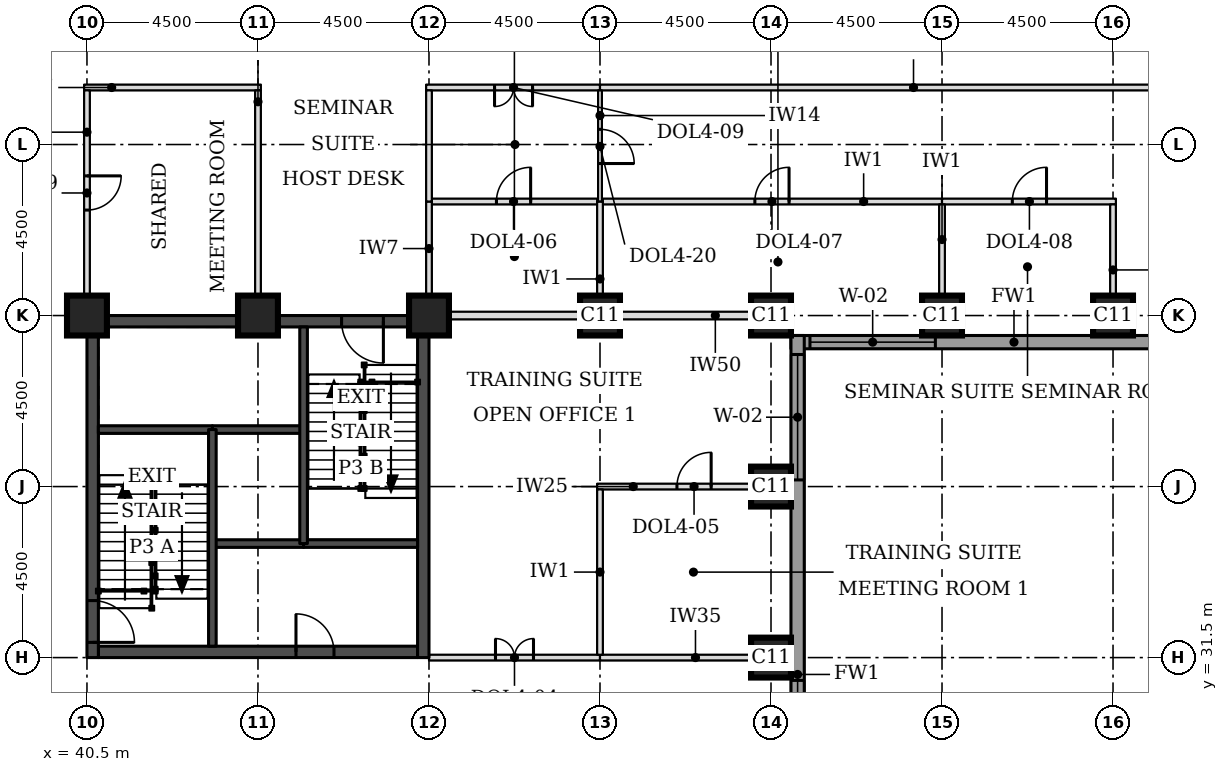
"""IFC4 building model, lengths in metres.
Left out: names, types, materials, properties, quantities, classifications, styles, units other than length and angle.
Written with IfcOpenShell. Run it as: python <this file> out.ifc"""

import sys

from ifc_helpers import new_model, si_unit, direction, frame, frame_2d, origin, origin_2d, place, context, subcontext, project, spatial, rectangle, extrude, element, fill, save


model = new_model("IFC4")
c1 = context("Model", 3, precision=1e-05, world=origin(), true_north=direction((0.0, 1.0)))
c2 = subcontext(c1, "Body", "Model", "MODEL_VIEW")
j1 = project(units=[si_unit("LENGTHUNIT", "METRE"), si_unit("PLANEANGLEUNIT", "RADIAN")], contexts=[c1])
p1 = place(None, origin())
s1 = spatial("IfcSite", under=j1, at=p1, CompositionType="ELEMENT")
p2 = place(p1, origin())
s2 = spatial("IfcBuilding", under=s1, at=p2, CompositionType="ELEMENT")
p3 = place(p2, frame((0.0, 0.0, 101.1)))
s3 = spatial("IfcBuildingStorey", under=s2, at=p3, CompositionType="ELEMENT", Elevation=101.1)
for number, where, z_axis, x_axis in (
    (1, (58.5, 31.5, 0.0), (0.0, 0.0, 1.0), (1.0, 0.0, 0.0)),
    (2, (58.5, 36.0, 0.0), (0.0, 0.0, 1.0), (1.0, 0.0, 0.0)),
    (3, (40.5, 40.5, 0.0), (0.0, 0.0, 1.0), (1.0, 0.0, 0.0)),
    (4, (45.0, 40.5, 0.0), (0.0, 0.0, 1.0), (1.0, 0.0, 0.0)),
    (5, (49.5, 40.5, 0.0), (0.0, 0.0, 1.0), (1.0, 0.0, 0.0)),
    (6, (54.0, 40.5, 0.0), (0.0, 0.0, 1.0), (1.0, 0.0, 0.0)),
    (7, (58.5, 40.5, 0.0), (0.0, 0.0, 1.0), (1.0, 0.0, 0.0)),
    (8, (63.0, 40.5, 0.0), (0.0, 0.0, 1.0), (1.0, 0.0, 0.0)),
    (9, (67.5, 40.5, 0.0), (0.0, 0.0, 1.0), (1.0, 0.0, 0.0)),
):
    element("IfcColumn", number, at=place(p3, frame(where, z_axis=z_axis, x_axis=x_axis)), inside=s3, PredefinedType="COLUMN", context=c2, shape_type="SweptSolid", body=[
        extrude(rectangle(XDim=1.05, YDim=1.05, at=origin_2d()), origin(), (0.0, 0.0, 1.0), 3.7),
    ])
p4 = place(p3, frame((40.8, 31.65, 0.0), z_axis=(0.0, 0.0, 1.0), x_axis=(1.0, 0.0, 0.0)))
e10 = element("IfcWall", 10, at=p4, inside=s3, PredefinedType="SHEAR", context=c2, shape_type="SweptSolid", body=[
    extrude(rectangle(XDim=8.4, YDim=0.3, at=frame_2d((4.2, 0.0))), origin(), (0.0, 0.0, 1.0), 3.7),
])
p5 = place(p4, frame((5.2, 0.0, 0.0)))
e11 = element("IfcOpeningElement", 11, at=p5, cuts=e10, PredefinedType="OPENING", context=c2, shape_type="SweptSolid", body=[
    extrude(rectangle(XDim=1.0, YDim=2.1, at=frame_2d((0.5, 1.05))), frame((0.0, 0.16, 0.0), z_axis=(0.0, -1.0, 0.0), x_axis=(1.0, 0.0, 0.0)), (0.0, 0.0, 1.0), 0.32),
])
p6 = place(p3, frame((40.8, 40.35, 0.0), z_axis=(0.0, 0.0, 1.0), x_axis=(1.0, 0.0, 0.0)))
e12 = element("IfcWall", 12, at=p6, inside=s3, PredefinedType="SHEAR", context=c2, shape_type="SweptSolid", body=[
    extrude(rectangle(XDim=8.4, YDim=0.3, at=frame_2d((4.2, 0.0))), origin(), (0.0, 0.0, 1.0), 3.7),
])
p7 = place(p6, frame((6.4, 0.0, 0.0)))
e13 = element("IfcOpeningElement", 13, at=p7, cuts=e12, PredefinedType="OPENING", context=c2, shape_type="SweptSolid", body=[
    extrude(rectangle(XDim=1.1, YDim=2.1, at=frame_2d((0.55, 1.05))), frame((0.0, 0.16, 0.0), z_axis=(0.0, -1.0, 0.0), x_axis=(1.0, 0.0, 0.0)), (0.0, 0.0, 1.0), 0.32),
])
p8 = place(p3, frame((40.65, 31.5, 0.0), z_axis=(0.0, 0.0, 1.0), x_axis=(0.0, 1.0, 0.0)))
e14 = element("IfcWall", 14, at=p8, inside=s3, PredefinedType="SHEAR", context=c2, shape_type="SweptSolid", body=[
    extrude(rectangle(XDim=9.0, YDim=0.3, at=frame_2d((4.5, 0.0))), origin(), (0.0, 0.0, 1.0), 3.7),
])
p9 = place(p8, frame((0.4, 0.0, 0.0)))
e15 = element("IfcOpeningElement", 15, at=p9, cuts=e14, PredefinedType="OPENING", context=c2, shape_type="SweptSolid", body=[
    extrude(rectangle(XDim=1.1, YDim=2.1, at=frame_2d((0.55, 1.05))), frame((0.0, 0.16, 0.0), z_axis=(0.0, -1.0, 0.0), x_axis=(1.0, 0.0, 0.0)), (0.0, 0.0, 1.0), 0.32),
])
p10 = place(p3, frame((49.35, 31.5, 0.0), z_axis=(0.0, 0.0, 1.0), x_axis=(0.0, 1.0, 0.0)))
e16 = element("IfcWall", 16, at=p10, inside=s3, PredefinedType="SHEAR", context=c2, shape_type="SweptSolid", body=[
    extrude(rectangle(XDim=9.0, YDim=0.3, at=frame_2d((4.5, 0.0))), origin(), (0.0, 0.0, 1.0), 3.7),
])
p11 = place(p3, frame((59.025, 39.8, 0.0), z_axis=(0.0, 0.0, 1.0), x_axis=(1.0, 0.0, 0.0)))
e17 = element("IfcWall", 17, at=p11, inside=s3, PredefinedType="STANDARD", context=c2, shape_type="SweptSolid", body=[
    extrude(rectangle(XDim=13.337, YDim=0.35, at=frame_2d((6.669, 0.0))), origin(), (0.0, 0.0, 1.0), 3.525),
])
p12 = place(p11, frame((0.5, 0.0, 0.9)))
e18 = element("IfcOpeningElement", 18, at=p12, cuts=e17, PredefinedType="OPENING", context=c2, shape_type="SweptSolid", body=[
    extrude(rectangle(XDim=3.3, YDim=1.9, at=frame_2d((1.65, 0.95))), frame((0.0, 0.185, 0.0), z_axis=(0.0, -1.0, 0.0), x_axis=(1.0, 0.0, 0.0)), (0.0, 0.0, 1.0), 0.37),
])
p13 = place(p3, frame((59.2, 22.138, 0.0), z_axis=(0.0, 0.0, 1.0), x_axis=(0.0, 1.0, 0.0)))
e19 = element("IfcWall", 19, at=p13, inside=s3, PredefinedType="STANDARD", context=c2, shape_type="SweptSolid", body=[
    extrude(rectangle(XDim=17.837, YDim=0.35, at=frame_2d((8.919, 0.0))), origin(), (0.0, 0.0, 1.0), 3.525),
])
p14 = place(p13, frame((5.462, 0.0, 0.9)))
e20 = element("IfcOpeningElement", 20, at=p14, cuts=e19, PredefinedType="OPENING", context=c2, shape_type="SweptSolid", body=[
    extrude(rectangle(XDim=3.3, YDim=1.9, at=frame_2d((1.65, 0.95))), frame((0.0, 0.185, 0.0), z_axis=(0.0, -1.0, 0.0), x_axis=(1.0, 0.0, 0.0)), (0.0, 0.0, 1.0), 0.37),
])
p15 = place(p13, frame((14.037, 0.0, 0.9)))
e21 = element("IfcOpeningElement", 21, at=p15, cuts=e19, PredefinedType="OPENING", context=c2, shape_type="SweptSolid", body=[
    extrude(rectangle(XDim=3.3, YDim=1.9, at=frame_2d((1.65, 0.95))), frame((0.0, 0.185, 0.0), z_axis=(0.0, -1.0, 0.0), x_axis=(1.0, 0.0, 0.0)), (0.0, 0.0, 1.0), 0.37),
])
p16 = place(p3, frame((49.5, 31.5, 0.0), z_axis=(0.0, 0.0, 1.0), x_axis=(1.0, 0.0, 0.0)))
e22 = element("IfcWall", 22, at=p16, inside=s3, PredefinedType="PARTITIONING", context=c2, shape_type="SweptSolid", body=[
    extrude(rectangle(XDim=4.5, YDim=0.15, at=frame_2d((2.25, 0.0))), origin(), (0.0, 0.0, 1.0), 2.55),
])
p17 = place(p16, frame((1.75, 0.0, 0.0)))
e23 = element("IfcOpeningElement", 23, at=p17, cuts=e22, PredefinedType="OPENING", context=c2, shape_type="SweptSolid", body=[
    extrude(rectangle(XDim=1.0, YDim=2.1, at=frame_2d((0.5, 1.05))), frame((0.0, 0.085, 0.0), z_axis=(0.0, -1.0, 0.0), x_axis=(1.0, 0.0, 0.0)), (0.0, 0.0, 1.0), 0.17),
])
p18 = place(p3, frame((54.0, 31.5, 0.0), z_axis=(0.0, 0.0, 1.0), x_axis=(1.0, 0.0, 0.0)))
e24 = element("IfcWall", 24, at=p18, inside=s3, PredefinedType="PARTITIONING", context=c2, shape_type="SweptSolid", body=[
    extrude(rectangle(XDim=5.025, YDim=0.15, at=frame_2d((2.512, 0.0))), origin(), (0.0, 0.0, 1.0), 2.55),
])
p19 = place(p3, frame((53.925, 36.0, 0.0), z_axis=(0.0, 0.0, 1.0), x_axis=(1.0, 0.0, 0.0)))
e25 = element("IfcWall", 25, at=p19, inside=s3, PredefinedType="PARTITIONING", context=c2, shape_type="SweptSolid", body=[
    extrude(rectangle(XDim=5.1, YDim=0.15, at=frame_2d((2.55, 0.0))), origin(), (0.0, 0.0, 1.0), 3.096),
])
p20 = place(p19, frame((2.1, 0.0, 0.0)))
e26 = element("IfcOpeningElement", 26, at=p20, cuts=e25, PredefinedType="OPENING", context=c2, shape_type="SweptSolid", body=[
    extrude(rectangle(XDim=0.9, YDim=2.1, at=frame_2d((0.45, 1.05))), frame((0.0, 0.085, 0.0), z_axis=(0.0, -1.0, 0.0), x_axis=(1.0, 0.0, 0.0)), (0.0, 0.0, 1.0), 0.17),
])
p21 = place(p3, frame((50.015, 40.5, 0.0), z_axis=(0.0, 0.0, 1.0), x_axis=(1.0, 0.0, 0.0)))
e27 = element("IfcWall", 27, at=p21, inside=s3, PredefinedType="PARTITIONING", context=c2, shape_type="SweptSolid", body=[
    extrude(rectangle(XDim=3.46, YDim=0.2, at=frame_2d((1.73, 0.0))), origin(), (0.0, 0.0, 1.0), 2.8),
])
p22 = place(p3, frame((54.495, 40.5, 0.0), z_axis=(0.0, 0.0, 1.0), x_axis=(1.0, 0.0, 0.0)))
e28 = element("IfcWall", 28, at=p22, inside=s3, PredefinedType="PARTITIONING", context=c2, shape_type="SweptSolid", body=[
    extrude(rectangle(XDim=3.48, YDim=0.2, at=frame_2d((1.74, 0.0))), origin(), (0.0, 0.0, 1.0), 2.8),
])
p23 = place(p3, frame((49.575, 43.5, 0.0), z_axis=(0.0, 0.0, 1.0), x_axis=(1.0, 0.0, 0.0)))
e29 = element("IfcWall", 29, at=p23, inside=s3, PredefinedType="PARTITIONING", context=c2, shape_type="SweptSolid", body=[
    extrude(rectangle(XDim=4.35, YDim=0.15, at=frame_2d((2.175, 0.0))), origin(), (0.0, 0.0, 1.0), 3.55),
])
p24 = place(p23, frame((1.7, 0.0, 0.0)))
e30 = element("IfcOpeningElement", 30, at=p24, cuts=e29, PredefinedType="OPENING", context=c2, shape_type="SweptSolid", body=[
    extrude(rectangle(XDim=0.9, YDim=2.1, at=frame_2d((0.45, 1.05))), frame((0.0, 0.085, 0.0), z_axis=(0.0, -1.0, 0.0), x_axis=(1.0, 0.0, 0.0)), (0.0, 0.0, 1.0), 0.17),
])
p25 = place(p3, frame((54.075, 43.5, 0.0), z_axis=(0.0, 0.0, 1.0), x_axis=(1.0, 0.0, 0.0)))
e31 = element("IfcWall", 31, at=p25, inside=s3, PredefinedType="PARTITIONING", context=c2, shape_type="SweptSolid", body=[
    extrude(rectangle(XDim=8.925, YDim=0.15, at=frame_2d((4.462, 0.0))), origin(), (0.0, 0.0, 1.0), 3.55),
])
p26 = place(p25, frame((4.0, 0.0, 0.0)))
e32 = element("IfcOpeningElement", 32, at=p26, cuts=e31, PredefinedType="OPENING", context=c2, shape_type="SweptSolid", body=[
    extrude(rectangle(XDim=0.9, YDim=2.1, at=frame_2d((0.45, 1.05))), frame((0.0, 0.085, 0.0), z_axis=(0.0, -1.0, 0.0), x_axis=(1.0, 0.0, 0.0)), (0.0, 0.0, 1.0), 0.17),
])
p27 = place(p3, frame((63.0, 43.5, 0.0), z_axis=(0.0, 0.0, 1.0), x_axis=(1.0, 0.0, 0.0)))
e33 = element("IfcWall", 33, at=p27, inside=s3, PredefinedType="PARTITIONING", context=c2, shape_type="SweptSolid", body=[
    extrude(rectangle(XDim=4.575, YDim=0.15, at=frame_2d((2.288, 0.0))), origin(), (0.0, 0.0, 1.0), 3.55),
])
p28 = place(p27, frame((1.85, 0.0, 0.0)))
e34 = element("IfcOpeningElement", 34, at=p28, cuts=e33, PredefinedType="OPENING", context=c2, shape_type="SweptSolid", body=[
    extrude(rectangle(XDim=0.9, YDim=2.1, at=frame_2d((0.45, 1.05))), frame((0.0, 0.085, 0.0), z_axis=(0.0, -1.0, 0.0), x_axis=(1.0, 0.0, 0.0)), (0.0, 0.0, 1.0), 0.17),
])
p29 = place(p3, frame((40.425, 46.5, 0.0), z_axis=(0.0, 0.0, 1.0), x_axis=(1.0, 0.0, 0.0)))
e35 = element("IfcWall", 35, at=p29, inside=s3, PredefinedType="PARTITIONING", context=c2, shape_type="SweptSolid", body=[
    extrude(rectangle(XDim=4.65, YDim=0.15, at=frame_2d((2.325, 0.0))), origin(), (0.0, 0.0, 1.0), 3.55),
])
p30 = place(p3, frame((49.425, 46.5, 0.0), z_axis=(0.0, 0.0, 1.0), x_axis=(1.0, 0.0, 0.0)))
e36 = element("IfcWall", 36, at=p30, inside=s3, PredefinedType="PARTITIONING", context=c2, shape_type="SweptSolid", body=[
    extrude(rectangle(XDim=4.575, YDim=0.15, at=frame_2d((2.288, 0.0))), origin(), (0.0, 0.0, 1.0), 3.55),
])
p31 = place(p30, frame((1.8, 0.0, 0.0)))
e37 = element("IfcOpeningElement", 37, at=p31, cuts=e36, PredefinedType="OPENING", context=c2, shape_type="SweptSolid", body=[
    extrude(rectangle(XDim=1.0, YDim=2.1, at=frame_2d((0.5, 1.05))), frame((0.0, 0.085, 0.0), z_axis=(0.0, -1.0, 0.0), x_axis=(1.0, 0.0, 0.0)), (0.0, 0.0, 1.0), 0.17),
])
p32 = place(p3, frame((54.0, 46.5, 0.0), z_axis=(0.0, 0.0, 1.0), x_axis=(1.0, 0.0, 0.0)))
e38 = element("IfcWall", 38, at=p32, inside=s3, PredefinedType="PARTITIONING", context=c2, shape_type="SweptSolid", body=[
    extrude(rectangle(XDim=16.5, YDim=0.15, at=frame_2d((8.25, 0.0))), origin(), (0.0, 0.0, 1.0), 3.55),
])
p33 = place(p3, frame((54.0, 31.575, 0.0), z_axis=(0.0, 0.0, 1.0), x_axis=(0.0, 1.0, 0.0)))
e39 = element("IfcWall", 39, at=p33, inside=s3, PredefinedType="PARTITIONING", context=c2, shape_type="SweptSolid", body=[
    extrude(rectangle(XDim=4.35, YDim=0.15, at=frame_2d((2.175, 0.0))), origin(), (0.0, 0.0, 1.0), 3.55),
])
for number, where, z_axis, x_axis in (
    (40, (63.0, 39.975, 0.0), (0.0, 0.0, 1.0), (0.0, 1.0, 0.0)),
    (41, (67.5, 39.975, 0.0), (0.0, 0.0, 1.0), (0.0, 1.0, 0.0)),
):
    element("IfcWall", number, at=place(p3, frame(where, z_axis=z_axis, x_axis=x_axis)), inside=s3, PredefinedType="PARTITIONING", context=c2, shape_type="SweptSolid", body=[
        extrude(rectangle(XDim=3.45, YDim=0.15, at=frame_2d((1.725, 0.0))), origin(), (0.0, 0.0, 1.0), 3.55),
    ])
p34 = place(p3, frame((40.5, 41.025, 0.0), z_axis=(0.0, 0.0, 1.0), x_axis=(0.0, 1.0, 0.0)))
e42 = element("IfcWall", 42, at=p34, inside=s3, PredefinedType="PARTITIONING", context=c2, shape_type="SweptSolid", body=[
    extrude(rectangle(XDim=5.4, YDim=0.15, at=frame_2d((2.7, 0.0))), origin(), (0.0, 0.0, 1.0), 3.55),
])
p35 = place(p34, frame((2.25, 0.0, 0.0)))
e43 = element("IfcOpeningElement", 43, at=p35, cuts=e42, PredefinedType="OPENING", context=c2, shape_type="SweptSolid", body=[
    extrude(rectangle(XDim=0.9, YDim=2.1, at=frame_2d((0.45, 1.05))), frame((0.0, 0.085, 0.0), z_axis=(0.0, -1.0, 0.0), x_axis=(1.0, 0.0, 0.0)), (0.0, 0.0, 1.0), 0.17),
])
p36 = place(p3, frame((45.0, 41.025, 0.0), z_axis=(0.0, 0.0, 1.0), x_axis=(0.0, 1.0, 0.0)))
e44 = element("IfcWall", 44, at=p36, inside=s3, PredefinedType="PARTITIONING", context=c2, shape_type="SweptSolid", body=[
    extrude(rectangle(XDim=5.4, YDim=0.15, at=frame_2d((2.7, 0.0))), origin(), (0.0, 0.0, 1.0), 3.55),
])
for number, where, z_axis, x_axis in (
    (45, (49.5, 41.025, 0.0), (0.0, 0.0, 1.0), (0.0, 1.0, 0.0)),
    (46, (54.0, 41.025, 0.0), (0.0, 0.0, 1.0), (0.0, 1.0, 0.0)),
):
    element("IfcWall", number, at=place(p3, frame(where, z_axis=z_axis, x_axis=x_axis)), inside=s3, PredefinedType="PARTITIONING", context=c2, shape_type="SweptSolid", body=[
        extrude(rectangle(XDim=2.475, YDim=0.15, at=frame_2d((1.238, 0.0))), origin(), (0.0, 0.0, 1.0), 3.55),
    ])
p37 = place(p3, frame((49.5, 43.5, 0.0), z_axis=(0.0, 0.0, 1.0), x_axis=(0.0, 1.0, 0.0)))
e47 = element("IfcWall", 47, at=p37, inside=s3, PredefinedType="PARTITIONING", context=c2, shape_type="SweptSolid", body=[
    extrude(rectangle(XDim=2.925, YDim=0.15, at=frame_2d((1.462, 0.0))), origin(), (0.0, 0.0, 1.0), 3.55),
])
p38 = place(p3, frame((54.0, 43.5, 0.0), z_axis=(0.0, 0.0, 1.0), x_axis=(0.0, 1.0, 0.0)))
e48 = element("IfcWall", 48, at=p38, inside=s3, PredefinedType="PARTITIONING", context=c2, shape_type="SweptSolid", body=[
    extrude(rectangle(XDim=2.925, YDim=0.1, at=frame_2d((1.462, 0.0))), origin(), (0.0, 0.0, 1.0), 3.55),
])
p39 = place(p38, frame((1.0, 0.0, 0.0)))
e49 = element("IfcOpeningElement", 49, at=p39, cuts=e48, PredefinedType="OPENING", context=c2, shape_type="SweptSolid", body=[
    extrude(rectangle(XDim=0.9, YDim=2.1, at=frame_2d((0.45, 1.05))), frame((0.0, 0.06, 0.0), z_axis=(0.0, -1.0, 0.0), x_axis=(1.0, 0.0, 0.0)), (0.0, 0.0, 1.0), 0.12),
])
p40 = place(p3, frame((43.8, 34.5, 0.0), z_axis=(0.0, 0.0, 1.0), x_axis=(1.0, 0.0, 0.0)))
e50 = element("IfcWall", 50, at=p40, inside=s3, PredefinedType="SOLIDWALL", context=c2, shape_type="SweptSolid", body=[
    extrude(rectangle(XDim=2.4, YDim=0.2, at=frame_2d((1.2, 0.0))), origin(), (0.0, 0.0, 1.0), 3.55),
])
p41 = place(p3, frame((46.2, 34.5, 0.0), z_axis=(0.0, 0.0, 1.0), x_axis=(1.0, 0.0, 0.0)))
e51 = element("IfcWall", 51, at=p41, inside=s3, PredefinedType="SOLIDWALL", context=c2, shape_type="SweptSolid", body=[
    extrude(rectangle(XDim=3.0, YDim=0.2, at=frame_2d((1.5, 0.0))), origin(), (0.0, 0.0, 1.0), 3.55),
])
p42 = place(p3, frame((43.8, 37.5, 0.0), z_axis=(0.0, 0.0, 1.0), x_axis=(1.0, 0.0, 0.0)))
e52 = element("IfcWall", 52, at=p42, inside=s3, PredefinedType="SOLIDWALL", context=c2, shape_type="SweptSolid", body=[
    extrude(rectangle(XDim=2.4, YDim=0.2, at=frame_2d((1.2, 0.0))), origin(), (0.0, 0.0, 1.0), 3.7),
])
p43 = place(p3, frame((40.8, 37.5, 0.0), z_axis=(0.0, 0.0, 1.0), x_axis=(1.0, 0.0, 0.0)))
e53 = element("IfcWall", 53, at=p43, inside=s3, PredefinedType="SOLIDWALL", context=c2, shape_type="SweptSolid", body=[
    extrude(rectangle(XDim=3.0, YDim=0.2, at=frame_2d((1.5, 0.0))), origin(), (0.0, 0.0, 1.0), 3.55),
])
for number, where, z_axis, x_axis in (
    (54, (43.8, 31.8, 0.0), (0.0, 0.0, 1.0), (0.0, 1.0, 0.0)),
    (55, (46.2, 34.5, 0.0), (0.0, 0.0, 1.0), (0.0, 1.0, 0.0)),
):
    element("IfcWall", number, at=place(p3, frame(where, z_axis=z_axis, x_axis=x_axis)), inside=s3, PredefinedType="SOLIDWALL", context=c2, shape_type="SweptSolid", body=[
        extrude(rectangle(XDim=5.7, YDim=0.2, at=frame_2d((2.85, 0.0))), origin(), (0.0, 0.0, 1.0), 3.55),
    ])
p44 = place(p12, origin())
e56 = element("IfcWindow", 56, at=p44, inside=s3, PartitioningType="SINGLE_PANEL", PredefinedType="WINDOW", context=c2, shape_type="SweptSolid", body=[
    extrude(rectangle(XDim=3.3, YDim=1.9, at=frame_2d((1.65, 0.95))), frame((0.0, 0.085, 0.0), z_axis=(0.0, -1.0, 0.0), x_axis=(1.0, 0.0, 0.0)), (0.0, 0.0, 1.0), 0.06),
])
fill(e18, e56)
p45 = place(p14, origin())
e57 = element("IfcWindow", 57, at=p45, inside=s3, PartitioningType="SINGLE_PANEL", PredefinedType="WINDOW", context=c2, shape_type="SweptSolid", body=[
    extrude(rectangle(XDim=3.3, YDim=1.9, at=frame_2d((1.65, 0.95))), frame((0.0, 0.085, 0.0), z_axis=(0.0, -1.0, 0.0), x_axis=(1.0, 0.0, 0.0)), (0.0, 0.0, 1.0), 0.06),
])
fill(e20, e57)
p46 = place(p15, origin())
e58 = element("IfcWindow", 58, at=p46, inside=s3, PartitioningType="SINGLE_PANEL", PredefinedType="WINDOW", context=c2, shape_type="SweptSolid", body=[
    extrude(rectangle(XDim=3.3, YDim=1.9, at=frame_2d((1.65, 0.95))), frame((0.0, 0.085, 0.0), z_axis=(0.0, -1.0, 0.0), x_axis=(1.0, 0.0, 0.0)), (0.0, 0.0, 1.0), 0.06),
])
fill(e21, e58)
p47 = place(p35, frame((0.9, 0.0, 0.0), z_axis=(0.0, 0.0, 1.0), x_axis=(-1.0, 0.0, 0.0)))
e59 = element("IfcDoor", 59, at=p47, inside=s3, OperationType="SINGLE_SWING_LEFT", PredefinedType="DOOR", context=c2, shape_type="SweptSolid", body=[
    extrude(rectangle(XDim=0.9, YDim=2.1, at=frame_2d((0.45, 1.05))), frame((0.0, 0.025, 0.0), z_axis=(0.0, -1.0, 0.0), x_axis=(1.0, 0.0, 0.0)), (0.0, 0.0, 1.0), 0.05),
])
fill(e43, e59)
p48 = place(p17, origin())
e60 = element("IfcDoor", 60, at=p48, inside=s3, OperationType="DOUBLE_DOOR_SINGLE_SWING", PredefinedType="DOOR", context=c2, shape_type="SweptSolid", body=[
    extrude(rectangle(XDim=1.0, YDim=2.1, at=frame_2d((0.5, 1.05))), frame((0.0, 0.025, 0.0), z_axis=(0.0, -1.0, 0.0), x_axis=(1.0, 0.0, 0.0)), (0.0, 0.0, 1.0), 0.05),
])
fill(e23, e60)
p49 = place(p20, origin())
e61 = element("IfcDoor", 61, at=p49, inside=s3, OperationType="SINGLE_SWING_RIGHT", PredefinedType="DOOR", context=c2, shape_type="SweptSolid", body=[
    extrude(rectangle(XDim=0.9, YDim=2.1, at=frame_2d((0.45, 1.05))), frame((0.0, 0.025, 0.0), z_axis=(0.0, -1.0, 0.0), x_axis=(1.0, 0.0, 0.0)), (0.0, 0.0, 1.0), 0.05),
])
fill(e26, e61)
p50 = place(p31, frame((1.0, 0.0, 0.0), z_axis=(0.0, 0.0, 1.0), x_axis=(-1.0, 0.0, 0.0)))
e62 = element("IfcDoor", 62, at=p50, inside=s3, OperationType="DOUBLE_DOOR_SINGLE_SWING", PredefinedType="DOOR", context=c2, shape_type="SweptSolid", body=[
    extrude(rectangle(XDim=1.0, YDim=2.1, at=frame_2d((0.5, 1.05))), frame((0.0, 0.025, 0.0), z_axis=(0.0, -1.0, 0.0), x_axis=(1.0, 0.0, 0.0)), (0.0, 0.0, 1.0), 0.05),
])
fill(e37, e62)
p51 = place(p39, frame((0.9, 0.0, 0.0), z_axis=(0.0, 0.0, 1.0), x_axis=(-1.0, 0.0, 0.0)))
e63 = element("IfcDoor", 63, at=p51, inside=s3, OperationType="SINGLE_SWING_RIGHT", PredefinedType="DOOR", context=c2, shape_type="SweptSolid", body=[
    extrude(rectangle(XDim=0.9, YDim=2.1, at=frame_2d((0.45, 1.05))), frame((0.0, 0.025, 0.0), z_axis=(0.0, -1.0, 0.0), x_axis=(1.0, 0.0, 0.0)), (0.0, 0.0, 1.0), 0.05),
])
fill(e49, e63)
p52 = place(p24, origin())
e64 = element("IfcDoor", 64, at=p52, inside=s3, OperationType="SINGLE_SWING_RIGHT", PredefinedType="DOOR", context=c2, shape_type="SweptSolid", body=[
    extrude(rectangle(XDim=0.9, YDim=2.1, at=frame_2d((0.45, 1.05))), frame((0.0, 0.025, 0.0), z_axis=(0.0, -1.0, 0.0), x_axis=(1.0, 0.0, 0.0)), (0.0, 0.0, 1.0), 0.05),
])
fill(e30, e64)
p53 = place(p26, origin())
e65 = element("IfcDoor", 65, at=p53, inside=s3, OperationType="SINGLE_SWING_RIGHT", PredefinedType="DOOR", context=c2, shape_type="SweptSolid", body=[
    extrude(rectangle(XDim=0.9, YDim=2.1, at=frame_2d((0.45, 1.05))), frame((0.0, 0.025, 0.0), z_axis=(0.0, -1.0, 0.0), x_axis=(1.0, 0.0, 0.0)), (0.0, 0.0, 1.0), 0.05),
])
fill(e32, e65)
p54 = place(p28, origin())
e66 = element("IfcDoor", 66, at=p54, inside=s3, OperationType="SINGLE_SWING_RIGHT", PredefinedType="DOOR", context=c2, shape_type="SweptSolid", body=[
    extrude(rectangle(XDim=0.9, YDim=2.1, at=frame_2d((0.45, 1.05))), frame((0.0, 0.025, 0.0), z_axis=(0.0, -1.0, 0.0), x_axis=(1.0, 0.0, 0.0)), (0.0, 0.0, 1.0), 0.05),
])
fill(e34, e66)
p55 = place(p9, frame((1.1, 0.0, 0.0), z_axis=(0.0, 0.0, 1.0), x_axis=(-1.0, 0.0, 0.0)))
e67 = element("IfcDoor", 67, at=p55, inside=s3, OperationType="SINGLE_SWING_RIGHT", PredefinedType="DOOR", context=c2, shape_type="SweptSolid", body=[
    extrude(rectangle(XDim=1.1, YDim=2.1, at=frame_2d((0.55, 1.05))), frame((0.0, 0.025, 0.0), z_axis=(0.0, -1.0, 0.0), x_axis=(1.0, 0.0, 0.0)), (0.0, 0.0, 1.0), 0.05),
])
fill(e15, e67)
p56 = place(p7, frame((1.1, 0.0, 0.0), z_axis=(0.0, 0.0, 1.0), x_axis=(-1.0, 0.0, 0.0)))
e68 = element("IfcDoor", 68, at=p56, inside=s3, OperationType="SINGLE_SWING_LEFT", PredefinedType="DOOR", context=c2, shape_type="SweptSolid", body=[
    extrude(rectangle(XDim=1.1, YDim=2.1, at=frame_2d((0.55, 1.05))), frame((0.0, 0.025, 0.0), z_axis=(0.0, -1.0, 0.0), x_axis=(1.0, 0.0, 0.0)), (0.0, 0.0, 1.0), 0.05),
])
fill(e13, e68)
p57 = place(p5, origin())
e69 = element("IfcDoor", 69, at=p57, inside=s3, OperationType="SINGLE_SWING_LEFT", PredefinedType="DOOR", context=c2, shape_type="SweptSolid", body=[
    extrude(rectangle(XDim=1.0, YDim=2.1, at=frame_2d((0.5, 1.05))), frame((0.0, 0.025, 0.0), z_axis=(0.0, -1.0, 0.0), x_axis=(1.0, 0.0, 0.0)), (0.0, 0.0, 1.0), 0.05),
])
fill(e11, e69)
save(model, sys.argv[1])
